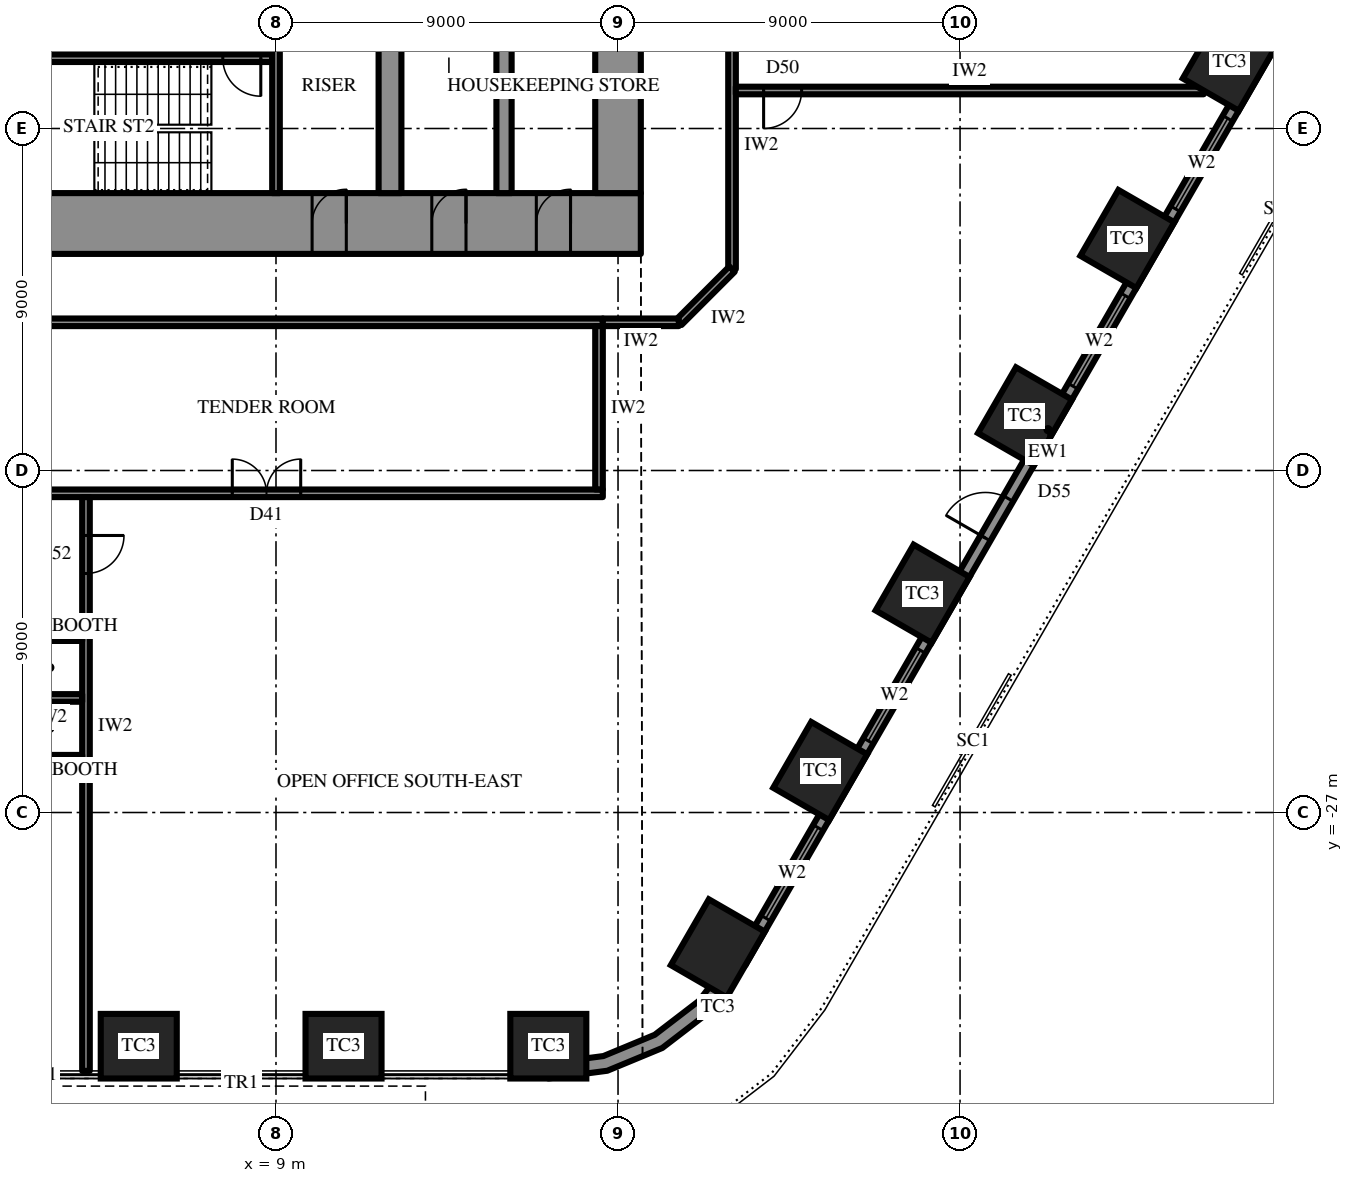
"""IFC4 building model, lengths in metres.
Left out: names, types, materials, properties, quantities, classifications, styles, units other than length and angle.
Written with IfcOpenShell. Run it as: python <this file> out.ifc"""

import sys

from ifc_helpers import new_model, si_unit, direction, frame, frame_2d, origin, origin_2d, place, context, subcontext, project, spatial, polyline, rectangle, outline, extrude, element, fill, save


model = new_model("IFC4")
c1 = context("Model", 3, precision=1e-05, world=origin(), true_north=direction((0.0, 1.0)))
c2 = subcontext(c1, "Body", "Model", "MODEL_VIEW")
j1 = project(units=[si_unit("LENGTHUNIT", "METRE"), si_unit("PLANEANGLEUNIT", "RADIAN")], contexts=[c1])
p1 = place(None, origin())
s1 = spatial("IfcSite", under=j1, at=p1, CompositionType="ELEMENT")
p2 = place(p1, origin())
s2 = spatial("IfcBuilding", under=s1, at=p2, CompositionType="ELEMENT")
p3 = place(p2, frame((0.0, 0.0, 73.9)))
s3 = spatial("IfcBuildingStorey", under=s2, at=p3, CompositionType="ELEMENT", Elevation=73.9)
for number, where, z_axis, x_axis in (
    (1, (5.389, -33.15, 0.0), (0.0, 0.0, 1.0), (1.0, 0.0, 0.0)),
    (2, (10.777, -33.15, 0.0), (0.0, 0.0, 1.0), (1.0, 0.0, 0.0)),
    (3, (16.166, -33.15, 0.0), (0.0, 0.0, 1.0), (1.0, 0.0, 0.0)),
    (4, (20.626, -30.575, 0.0), (0.0, 0.0, 1.0), (0.5, 0.866, 0.0)),
    (5, (23.32, -25.908, 0.0), (0.0, 0.0, 1.0), (0.5, 0.866, 0.0)),
    (6, (26.014, -21.242, 0.0), (0.0, 0.0, 1.0), (0.5, 0.866, 0.0)),
    (7, (28.709, -16.575, 0.0), (0.0, 0.0, 1.0), (0.5, 0.866, 0.0)),
    (8, (31.403, -11.908, 0.0), (0.0, 0.0, 1.0), (0.5, 0.866, 0.0)),
    (9, (34.097, -7.242, 0.0), (0.0, 0.0, 1.0), (0.5, 0.866, 0.0)),
):
    element("IfcColumn", number, at=place(p3, frame(where, z_axis=z_axis, x_axis=x_axis)), inside=s3, PredefinedType="COLUMN", context=c2, shape_type="SweptSolid", body=[
        extrude(rectangle(XDim=2.0, YDim=1.7, at=origin_2d()), origin(), (0.0, 0.0, 1.0), 4.2),
    ])
p4 = place(p3, frame((18.6, -11.5, 0.0), z_axis=(0.0, 0.0, 1.0), x_axis=(-1.0, 0.0, 0.0)))
e10 = element("IfcWall", 10, at=p4, inside=s3, PredefinedType="SHEAR", context=c2, shape_type="SweptSolid", body=[
    extrude(rectangle(XDim=37.2, YDim=1.6, at=frame_2d((18.6, 0.0))), origin(), (0.0, 0.0, 1.0), 4.2),
])
p5 = place(p4, frame((19.45, 0.0, 0.0)))
e11 = element("IfcOpeningElement", 11, at=p5, cuts=e10, PredefinedType="OPENING", context=c2, shape_type="SweptSolid", body=[
    extrude(rectangle(XDim=0.9, YDim=2.2, at=frame_2d((0.45, 1.1))), frame((0.0, 0.81, 0.0), z_axis=(0.0, -1.0, 0.0), x_axis=(1.0, 0.0, 0.0)), (0.0, 0.0, 1.0), 1.62),
])
p6 = place(p4, frame((22.45, 0.0, 0.0)))
e12 = element("IfcOpeningElement", 12, at=p6, cuts=e10, PredefinedType="OPENING", context=c2, shape_type="SweptSolid", body=[
    extrude(rectangle(XDim=0.9, YDim=2.2, at=frame_2d((0.45, 1.1))), frame((0.0, 0.81, 0.0), z_axis=(0.0, -1.0, 0.0), x_axis=(1.0, 0.0, 0.0)), (0.0, 0.0, 1.0), 1.62),
])
p7 = place(p4, frame((25.5, 0.0, 0.0)))
e13 = element("IfcOpeningElement", 13, at=p7, cuts=e10, PredefinedType="OPENING", context=c2, shape_type="SweptSolid", body=[
    extrude(rectangle(XDim=1.0, YDim=2.2, at=frame_2d((0.5, 1.1))), frame((0.0, 0.81, 0.0), z_axis=(0.0, -1.0, 0.0), x_axis=(1.0, 0.0, 0.0)), (0.0, 0.0, 1.0), 1.62),
])
p8 = place(p4, frame((1.85, 0.0, 0.0)))
e14 = element("IfcOpeningElement", 14, at=p8, cuts=e10, PredefinedType="OPENING", context=c2, shape_type="SweptSolid", body=[
    extrude(rectangle(XDim=0.9, YDim=2.2, at=frame_2d((0.45, 1.1))), frame((0.0, 0.81, 0.0), z_axis=(0.0, -1.0, 0.0), x_axis=(1.0, 0.0, 0.0)), (0.0, 0.0, 1.0), 1.62),
])
p9 = place(p4, frame((4.6, 0.0, 0.0)))
e15 = element("IfcOpeningElement", 15, at=p9, cuts=e10, PredefinedType="OPENING", context=c2, shape_type="SweptSolid", body=[
    extrude(rectangle(XDim=0.9, YDim=2.2, at=frame_2d((0.45, 1.1))), frame((0.0, 0.81, 0.0), z_axis=(0.0, -1.0, 0.0), x_axis=(1.0, 0.0, 0.0)), (0.0, 0.0, 1.0), 1.62),
])
p10 = place(p4, frame((7.75, 0.0, 0.0)))
e16 = element("IfcOpeningElement", 16, at=p10, cuts=e10, PredefinedType="OPENING", context=c2, shape_type="SweptSolid", body=[
    extrude(rectangle(XDim=0.9, YDim=2.2, at=frame_2d((0.45, 1.1))), frame((0.0, 0.81, 0.0), z_axis=(0.0, -1.0, 0.0), x_axis=(1.0, 0.0, 0.0)), (0.0, 0.0, 1.0), 1.62),
])
p11 = place(p4, frame((28.55, 0.0, 0.0)))
e17 = element("IfcOpeningElement", 17, at=p11, cuts=e10, PredefinedType="OPENING", context=c2, shape_type="SweptSolid", body=[
    extrude(rectangle(XDim=0.9, YDim=2.2, at=frame_2d((0.45, 1.1))), frame((0.0, 0.81, 0.0), z_axis=(0.0, -1.0, 0.0), x_axis=(1.0, 0.0, 0.0)), (0.0, 0.0, 1.0), 1.62),
])
p12 = place(p4, frame((31.7, 0.0, 0.0)))
e18 = element("IfcOpeningElement", 18, at=p12, cuts=e10, PredefinedType="OPENING", context=c2, shape_type="SweptSolid", body=[
    extrude(rectangle(XDim=0.9, YDim=2.2, at=frame_2d((0.45, 1.1))), frame((0.0, 0.81, 0.0), z_axis=(0.0, -1.0, 0.0), x_axis=(1.0, 0.0, 0.0)), (0.0, 0.0, 1.0), 1.62),
])
p13 = place(p4, frame((34.45, 0.0, 0.0)))
e19 = element("IfcOpeningElement", 19, at=p13, cuts=e10, PredefinedType="OPENING", context=c2, shape_type="SweptSolid", body=[
    extrude(rectangle(XDim=0.9, YDim=2.2, at=frame_2d((0.45, 1.1))), frame((0.0, 0.81, 0.0), z_axis=(0.0, -1.0, 0.0), x_axis=(1.0, 0.0, 0.0)), (0.0, 0.0, 1.0), 1.62),
])
p14 = place(p3, frame((18.0, -10.7, 0.0), z_axis=(0.0, 0.0, 1.0), x_axis=(0.0, 1.0, 0.0)))
e20 = element("IfcWall", 20, at=p14, inside=s3, PredefinedType="SHEAR", context=c2, shape_type="SweptSolid", body=[
    extrude(rectangle(XDim=21.4, YDim=1.2, at=frame_2d((10.7, 0.0))), origin(), (0.0, 0.0, 1.0), 4.2),
])
p15 = place(p14, frame((9.8, 0.0, 0.0)))
e21 = element("IfcOpeningElement", 21, at=p15, cuts=e20, PredefinedType="OPENING", context=c2, shape_type="SweptSolid", body=[
    extrude(rectangle(XDim=1.8, YDim=2.4, at=frame_2d((0.9, 1.2))), frame((0.0, 0.61, 0.0), z_axis=(0.0, -1.0, 0.0), x_axis=(1.0, 0.0, 0.0)), (0.0, 0.0, 1.0), 1.22),
])
p16 = place(p3, frame((12.0, -10.7, 0.0), z_axis=(0.0, 0.0, 1.0), x_axis=(0.0, 1.0, 0.0)))
e22 = element("IfcWall", 22, at=p16, inside=s3, PredefinedType="SHEAR", context=c2, shape_type="SweptSolid", body=[
    extrude(rectangle(XDim=21.4, YDim=0.6, at=frame_2d((10.7, 0.0))), origin(), (0.0, 0.0, 1.0), 4.2),
])
p17 = place(p16, frame((9.8, 0.0, 0.0)))
e23 = element("IfcOpeningElement", 23, at=p17, cuts=e22, PredefinedType="OPENING", context=c2, shape_type="SweptSolid", body=[
    extrude(rectangle(XDim=1.8, YDim=2.4, at=frame_2d((0.9, 1.2))), frame((0.0, 0.31, 0.0), z_axis=(0.0, -1.0, 0.0), x_axis=(1.0, 0.0, 0.0)), (0.0, 0.0, 1.0), 0.62),
])
p18 = place(p3, frame((15.0, -10.7, 0.0), z_axis=(0.0, 0.0, 1.0), x_axis=(0.0, 1.0, 0.0)))
e24 = element("IfcWall", 24, at=p18, inside=s3, PredefinedType="SHEAR", context=c2, shape_type="SweptSolid", body=[
    extrude(rectangle(XDim=21.4, YDim=0.4, at=frame_2d((10.7, 0.0))), origin(), (0.0, 0.0, 1.0), 4.2),
])
p19 = place(p18, frame((9.8, 0.0, 0.0)))
e25 = element("IfcOpeningElement", 25, at=p19, cuts=e24, PredefinedType="OPENING", context=c2, shape_type="SweptSolid", body=[
    extrude(rectangle(XDim=1.8, YDim=2.4, at=frame_2d((0.9, 1.2))), frame((0.0, 0.21, 0.0), z_axis=(0.0, -1.0, 0.0), x_axis=(1.0, 0.0, 0.0)), (0.0, 0.0, 1.0), 0.42),
])
p20 = place(p3, frame((8.9, -7.15, 0.0), z_axis=(0.0, 0.0, 1.0), x_axis=(-1.0, 0.0, 0.0)))
e26 = element("IfcWall", 26, at=p20, inside=s3, PredefinedType="SHEAR", context=c2, shape_type="SweptSolid", body=[
    extrude(rectangle(XDim=8.6, YDim=0.2, at=frame_2d((4.3, 0.0))), origin(), (0.0, 0.0, 1.0), 4.2),
])
p21 = place(p20, frame((0.3, 0.0, 0.0)))
e27 = element("IfcOpeningElement", 27, at=p21, cuts=e26, PredefinedType="OPENING", context=c2, shape_type="SweptSolid", body=[
    extrude(rectangle(XDim=1.0, YDim=2.2, at=frame_2d((0.5, 1.1))), frame((0.0, 0.11, 0.0), z_axis=(0.0, -1.0, 0.0), x_axis=(1.0, 0.0, 0.0)), (0.0, 0.0, 1.0), 0.22),
])
p22 = place(p3, origin())
e28 = element("IfcWall", 28, at=p22, inside=s3, PredefinedType="SOLIDWALL", context=c2, shape_type="SweptSolid", body=[
    extrude(outline(polyline([(16.166, -34.0), (17.719, -33.796), (19.166, -33.196), (20.408, -32.243), (21.362, -31.0), (21.016, -30.8), (20.125, -31.96), (18.966, -32.85), (17.615, -33.409), (16.166, -33.6), (16.166, -34.0)])), origin(), (0.0, 0.0, 1.0), 2.7),
])
p23 = place(p3, frame((21.232, -30.925, 0.0), z_axis=(0.0, 0.0, 1.0), x_axis=(0.499999163675, 0.866025886636, 0.0)))
e29 = element("IfcWall", 29, at=p23, inside=s3, PredefinedType="SOLIDWALL", context=c2, shape_type="SweptSolid", body=[
    extrude(rectangle(XDim=32.332, YDim=0.3, at=frame_2d((16.166, 0.0))), origin(), (0.0, 0.0, 1.0), 2.7),
])
p24 = place(p23, frame((1.319, 0.0, 0.6)))
e30 = element("IfcOpeningElement", 30, at=p24, cuts=e29, PredefinedType="OPENING", context=c2, shape_type="SweptSolid", body=[
    extrude(rectangle(XDim=2.75, YDim=1.85, at=frame_2d((1.375, 0.925))), frame((0.0, 0.16, 0.0), z_axis=(0.0, -1.0, 0.0), x_axis=(1.0, 0.0, 0.0)), (0.0, 0.0, 1.0), 0.32),
])
p25 = place(p23, frame((6.708, 0.0, 0.6)))
e31 = element("IfcOpeningElement", 31, at=p25, cuts=e29, PredefinedType="OPENING", context=c2, shape_type="SweptSolid", body=[
    extrude(rectangle(XDim=2.75, YDim=1.85, at=frame_2d((1.375, 0.925))), frame((0.0, 0.16, 0.0), z_axis=(0.0, -1.0, 0.0), x_axis=(1.0, 0.0, 0.0)), (0.0, 0.0, 1.0), 0.32),
])
p26 = place(p23, frame((12.872, 0.0, 0.0)))
e32 = element("IfcOpeningElement", 32, at=p26, cuts=e29, PredefinedType="OPENING", context=c2, shape_type="SweptSolid", body=[
    extrude(rectangle(XDim=1.2, YDim=2.4, at=frame_2d((0.6, 1.2))), frame((0.0, 0.16, 0.0), z_axis=(0.0, -1.0, 0.0), x_axis=(1.0, 0.0, 0.0)), (0.0, 0.0, 1.0), 0.32),
])
p27 = place(p23, frame((17.485, 0.0, 0.6)))
e33 = element("IfcOpeningElement", 33, at=p27, cuts=e29, PredefinedType="OPENING", context=c2, shape_type="SweptSolid", body=[
    extrude(rectangle(XDim=2.75, YDim=1.85, at=frame_2d((1.375, 0.925))), frame((0.0, 0.16, 0.0), z_axis=(0.0, -1.0, 0.0), x_axis=(1.0, 0.0, 0.0)), (0.0, 0.0, 1.0), 0.32),
])
p28 = place(p23, frame((22.874, 0.0, 0.6)))
e34 = element("IfcOpeningElement", 34, at=p28, cuts=e29, PredefinedType="OPENING", context=c2, shape_type="SweptSolid", body=[
    extrude(rectangle(XDim=2.75, YDim=1.85, at=frame_2d((1.375, 0.925))), frame((0.0, 0.16, 0.0), z_axis=(0.0, -1.0, 0.0), x_axis=(1.0, 0.0, 0.0)), (0.0, 0.0, 1.0), 0.32),
])
p29 = place(p23, frame((28.262, 0.0, 0.6)))
e35 = element("IfcOpeningElement", 35, at=p29, cuts=e29, PredefinedType="OPENING", context=c2, shape_type="SweptSolid", body=[
    extrude(rectangle(XDim=2.75, YDim=1.85, at=frame_2d((1.375, 0.925))), frame((0.0, 0.16, 0.0), z_axis=(0.0, -1.0, 0.0), x_axis=(1.0, 0.0, 0.0)), (0.0, 0.0, 1.0), 0.32),
])
p30 = place(p3, frame((9.0, -5.05, 0.0), z_axis=(0.0, 0.0, 1.0), x_axis=(0.0, -1.0, 0.0)))
e36 = element("IfcWall", 36, at=p30, inside=s3, PredefinedType="PARTITIONING", context=c2, shape_type="SweptSolid", body=[
    extrude(rectangle(XDim=5.65, YDim=0.2, at=frame_2d((2.825, 0.0))), origin(), (0.0, 0.0, 1.0), 4.0),
])
p31 = place(p3, frame((17.6, -14.1, 0.0), z_axis=(0.0, 0.0, 1.0), x_axis=(-1.0, 0.0, 0.0)))
e37 = element("IfcWall", 37, at=p31, inside=s3, PredefinedType="PARTITIONING", context=c2, shape_type="SweptSolid", body=[
    extrude(rectangle(XDim=35.2, YDim=0.2, at=frame_2d((17.6, 0.0))), origin(), (0.0, 0.0, 1.0), 4.0),
])
p32 = place(p3, frame((17.6, -18.6, 0.0), z_axis=(0.0, 0.0, 1.0), x_axis=(-1.0, 0.0, 0.0)))
e38 = element("IfcWall", 38, at=p32, inside=s3, PredefinedType="PARTITIONING", context=c2, shape_type="SweptSolid", body=[
    extrude(rectangle(XDim=35.2, YDim=0.2, at=frame_2d((17.6, 0.0))), origin(), (0.0, 0.0, 1.0), 4.0),
])
p33 = place(p32, frame((7.95, 0.0, 0.0)))
e39 = element("IfcOpeningElement", 39, at=p33, cuts=e38, PredefinedType="OPENING", context=c2, shape_type="SweptSolid", body=[
    extrude(rectangle(XDim=1.8, YDim=2.4, at=frame_2d((0.9, 1.2))), frame((0.0, 0.11, 0.0), z_axis=(0.0, -1.0, 0.0), x_axis=(1.0, 0.0, 0.0)), (0.0, 0.0, 1.0), 0.22),
])
p34 = place(p32, frame((25.45, 0.0, 0.0)))
e40 = element("IfcOpeningElement", 40, at=p34, cuts=e38, PredefinedType="OPENING", context=c2, shape_type="SweptSolid", body=[
    extrude(rectangle(XDim=1.8, YDim=2.4, at=frame_2d((0.9, 1.2))), frame((0.0, 0.11, 0.0), z_axis=(0.0, -1.0, 0.0), x_axis=(1.0, 0.0, 0.0)), (0.0, 0.0, 1.0), 0.22),
])
p35 = place(p3, frame((17.5, -14.2, 0.0), z_axis=(0.0, 0.0, 1.0), x_axis=(0.0, -1.0, 0.0)))
e41 = element("IfcWall", 41, at=p35, inside=s3, PredefinedType="PARTITIONING", context=c2, shape_type="SweptSolid", body=[
    extrude(rectangle(XDim=4.3, YDim=0.2, at=frame_2d((2.15, 0.0))), origin(), (0.0, 0.0, 1.0), 4.0),
])
p36 = place(p3, frame((21.0, -6.201, 0.0), z_axis=(0.0, 0.0, 1.0), x_axis=(0.0, -1.0, 0.0)))
e42 = element("IfcWall", 42, at=p36, inside=s3, PredefinedType="PARTITIONING", context=c2, shape_type="SweptSolid", body=[
    extrude(rectangle(XDim=6.499, YDim=0.2, at=frame_2d((3.25, 0.0))), origin(), (0.0, 0.0, 1.0), 4.0),
])
p37 = place(p3, frame((21.0, -12.7, 0.0), z_axis=(0.0, 0.0, 1.0), x_axis=(-0.707045124756, -0.707168432242, 0.0)))
e43 = element("IfcWall", 43, at=p37, inside=s3, PredefinedType="PARTITIONING", context=c2, shape_type="SweptSolid", body=[
    extrude(rectangle(XDim=1.98, YDim=0.2, at=frame_2d((0.99, 0.0))), origin(), (0.0, 0.0, 1.0), 4.0),
])
p38 = place(p3, frame((19.6, -14.1, 0.0), z_axis=(0.0, 0.0, 1.0), x_axis=(-1.0, 0.0, 0.0)))
e44 = element("IfcWall", 44, at=p38, inside=s3, PredefinedType="PARTITIONING", context=c2, shape_type="SweptSolid", body=[
    extrude(rectangle(XDim=2.0, YDim=0.2, at=frame_2d((1.0, 0.0))), origin(), (0.0, 0.0, 1.0), 4.0),
])
p39 = place(p3, frame((4.0, -18.7, 0.0), z_axis=(0.0, 0.0, 1.0), x_axis=(0.0, -1.0, 0.0)))
e45 = element("IfcWall", 45, at=p39, inside=s3, PredefinedType="PARTITIONING", context=c2, shape_type="SweptSolid", body=[
    extrude(rectangle(XDim=15.1, YDim=0.2, at=frame_2d((7.55, 0.0))), origin(), (0.0, 0.0, 1.0), 4.0),
])
p40 = place(p39, frame((1.01, 0.0, 0.0)))
e46 = element("IfcOpeningElement", 46, at=p40, cuts=e45, PredefinedType="OPENING", context=c2, shape_type="SweptSolid", body=[
    extrude(rectangle(XDim=1.0, YDim=2.2, at=frame_2d((0.5, 1.1))), frame((0.0, 0.11, 0.0), z_axis=(0.0, -1.0, 0.0), x_axis=(1.0, 0.0, 0.0)), (0.0, 0.0, 1.0), 0.22),
])
p41 = place(p3, frame((21.1, -8.0, 0.0), z_axis=(0.0, 0.0, 1.0), x_axis=(1.0, 0.0, 0.0)))
e47 = element("IfcWall", 47, at=p41, inside=s3, PredefinedType="PARTITIONING", context=c2, shape_type="SweptSolid", body=[
    extrude(rectangle(XDim=12.311, YDim=0.2, at=frame_2d((6.155, 0.0))), origin(), (0.0, 0.0, 1.0), 4.0),
])
p42 = place(p41, frame((0.731, 0.0, 0.0)))
e48 = element("IfcOpeningElement", 48, at=p42, cuts=e47, PredefinedType="OPENING", context=c2, shape_type="SweptSolid", body=[
    extrude(rectangle(XDim=1.0, YDim=2.2, at=frame_2d((0.5, 1.1))), frame((0.0, 0.11, 0.0), z_axis=(0.0, -1.0, 0.0), x_axis=(1.0, 0.0, 0.0)), (0.0, 0.0, 1.0), 0.22),
])
for number, where, z_axis, x_axis in (
    (49, (3.9, -22.385, 0.0), (0.0, 0.0, 1.0), (-1.0, 0.0, 0.0)),
    (50, (3.9, -23.985, 0.0), (0.0, 0.0, 1.0), (-1.0, 0.0, 0.0)),
    (51, (3.9, -25.585, 0.0), (0.0, 0.0, 1.0), (-1.0, 0.0, 0.0)),
):
    element("IfcWall", number, at=place(p3, frame(where, z_axis=z_axis, x_axis=x_axis)), inside=s3, PredefinedType="PARTITIONING", context=c2, shape_type="SweptSolid", body=[
        extrude(rectangle(XDim=1.7, YDim=0.2, at=frame_2d((0.85, 0.0))), origin(), (0.0, 0.0, 1.0), 4.0),
    ])
p43 = place(p24, origin())
e52 = element("IfcWindow", 52, at=p43, inside=s3, PartitioningType="SINGLE_PANEL", PredefinedType="WINDOW", context=c2, shape_type="SweptSolid", body=[
    extrude(rectangle(XDim=2.75, YDim=1.85, at=frame_2d((1.375, 0.925))), frame((0.0, 0.03, 0.0), z_axis=(0.0, -1.0, 0.0), x_axis=(1.0, 0.0, 0.0)), (0.0, 0.0, 1.0), 0.06),
])
fill(e30, e52)
p44 = place(p25, origin())
e53 = element("IfcWindow", 53, at=p44, inside=s3, PartitioningType="SINGLE_PANEL", PredefinedType="WINDOW", context=c2, shape_type="SweptSolid", body=[
    extrude(rectangle(XDim=2.75, YDim=1.85, at=frame_2d((1.375, 0.925))), frame((0.0, 0.03, 0.0), z_axis=(0.0, -1.0, 0.0), x_axis=(1.0, 0.0, 0.0)), (0.0, 0.0, 1.0), 0.06),
])
fill(e31, e53)
p45 = place(p26, origin())
e54 = element("IfcDoor", 54, at=p45, inside=s3, OperationType="SINGLE_SWING_RIGHT", PredefinedType="DOOR", context=c2, shape_type="SweptSolid", body=[
    extrude(rectangle(XDim=1.2, YDim=2.4, at=frame_2d((0.6, 1.2))), frame((0.0, 0.025, 0.0), z_axis=(0.0, -1.0, 0.0), x_axis=(1.0, 0.0, 0.0)), (0.0, 0.0, 1.0), 0.05),
])
fill(e32, e54)
p46 = place(p27, origin())
e55 = element("IfcWindow", 55, at=p46, inside=s3, PartitioningType="SINGLE_PANEL", PredefinedType="WINDOW", context=c2, shape_type="SweptSolid", body=[
    extrude(rectangle(XDim=2.75, YDim=1.85, at=frame_2d((1.375, 0.925))), frame((0.0, 0.03, 0.0), z_axis=(0.0, -1.0, 0.0), x_axis=(1.0, 0.0, 0.0)), (0.0, 0.0, 1.0), 0.06),
])
fill(e33, e55)
p47 = place(p28, origin())
e56 = element("IfcWindow", 56, at=p47, inside=s3, PartitioningType="SINGLE_PANEL", PredefinedType="WINDOW", context=c2, shape_type="SweptSolid", body=[
    extrude(rectangle(XDim=2.75, YDim=1.85, at=frame_2d((1.375, 0.925))), frame((0.0, 0.03, 0.0), z_axis=(0.0, -1.0, 0.0), x_axis=(1.0, 0.0, 0.0)), (0.0, 0.0, 1.0), 0.06),
])
fill(e34, e56)
p48 = place(p21, origin())
e57 = element("IfcDoor", 57, at=p48, inside=s3, OperationType="SINGLE_SWING_RIGHT", PredefinedType="DOOR", context=c2, shape_type="SweptSolid", body=[
    extrude(rectangle(XDim=1.0, YDim=2.2, at=frame_2d((0.5, 1.1))), frame((0.0, 0.025, 0.0), z_axis=(0.0, -1.0, 0.0), x_axis=(1.0, 0.0, 0.0)), (0.0, 0.0, 1.0), 0.05),
])
fill(e27, e57)
p49 = place(p8, frame((0.9, 0.0, 0.0), z_axis=(0.0, 0.0, 1.0), x_axis=(-1.0, 0.0, 0.0)))
e58 = element("IfcDoor", 58, at=p49, inside=s3, OperationType="SINGLE_SWING_LEFT", PredefinedType="DOOR", context=c2, shape_type="SweptSolid", body=[
    extrude(rectangle(XDim=0.9, YDim=2.2, at=frame_2d((0.45, 1.1))), frame((0.0, 0.025, 0.0), z_axis=(0.0, -1.0, 0.0), x_axis=(1.0, 0.0, 0.0)), (0.0, 0.0, 1.0), 0.05),
])
fill(e14, e58)
p50 = place(p9, frame((0.9, 0.0, 0.0), z_axis=(0.0, 0.0, 1.0), x_axis=(-1.0, 0.0, 0.0)))
e59 = element("IfcDoor", 59, at=p50, inside=s3, OperationType="SINGLE_SWING_LEFT", PredefinedType="DOOR", context=c2, shape_type="SweptSolid", body=[
    extrude(rectangle(XDim=0.9, YDim=2.2, at=frame_2d((0.45, 1.1))), frame((0.0, 0.025, 0.0), z_axis=(0.0, -1.0, 0.0), x_axis=(1.0, 0.0, 0.0)), (0.0, 0.0, 1.0), 0.05),
])
fill(e15, e59)
p51 = place(p10, frame((0.9, 0.0, 0.0), z_axis=(0.0, 0.0, 1.0), x_axis=(-1.0, 0.0, 0.0)))
e60 = element("IfcDoor", 60, at=p51, inside=s3, OperationType="SINGLE_SWING_LEFT", PredefinedType="DOOR", context=c2, shape_type="SweptSolid", body=[
    extrude(rectangle(XDim=0.9, YDim=2.2, at=frame_2d((0.45, 1.1))), frame((0.0, 0.025, 0.0), z_axis=(0.0, -1.0, 0.0), x_axis=(1.0, 0.0, 0.0)), (0.0, 0.0, 1.0), 0.05),
])
fill(e16, e60)
p52 = place(p33, frame((1.8, 0.0, 0.0), z_axis=(0.0, 0.0, 1.0), x_axis=(-1.0, 0.0, 0.0)))
e61 = element("IfcDoor", 61, at=p52, inside=s3, OperationType="DOUBLE_DOOR_SINGLE_SWING", PredefinedType="DOOR", context=c2, shape_type="SweptSolid", body=[
    extrude(rectangle(XDim=1.8, YDim=2.4, at=frame_2d((0.9, 1.2))), frame((0.0, 0.025, 0.0), z_axis=(0.0, -1.0, 0.0), x_axis=(1.0, 0.0, 0.0)), (0.0, 0.0, 1.0), 0.05),
])
fill(e39, e61)
p53 = place(p40, origin())
e62 = element("IfcDoor", 62, at=p53, inside=s3, OperationType="SINGLE_SWING_RIGHT", PredefinedType="DOOR", context=c2, shape_type="SweptSolid", body=[
    extrude(rectangle(XDim=1.0, YDim=2.2, at=frame_2d((0.5, 1.1))), frame((0.0, 0.025, 0.0), z_axis=(0.0, -1.0, 0.0), x_axis=(1.0, 0.0, 0.0)), (0.0, 0.0, 1.0), 0.05),
])
fill(e46, e62)
p54 = place(p42, frame((1.0, 0.0, 0.0), z_axis=(0.0, 0.0, 1.0), x_axis=(-1.0, 0.0, 0.0)))
e63 = element("IfcDoor", 63, at=p54, inside=s3, OperationType="SINGLE_SWING_LEFT", PredefinedType="DOOR", context=c2, shape_type="SweptSolid", body=[
    extrude(rectangle(XDim=1.0, YDim=2.2, at=frame_2d((0.5, 1.1))), frame((0.0, 0.025, 0.0), z_axis=(0.0, -1.0, 0.0), x_axis=(1.0, 0.0, 0.0)), (0.0, 0.0, 1.0), 0.05),
])
fill(e48, e63)
save(model, sys.argv[1])
